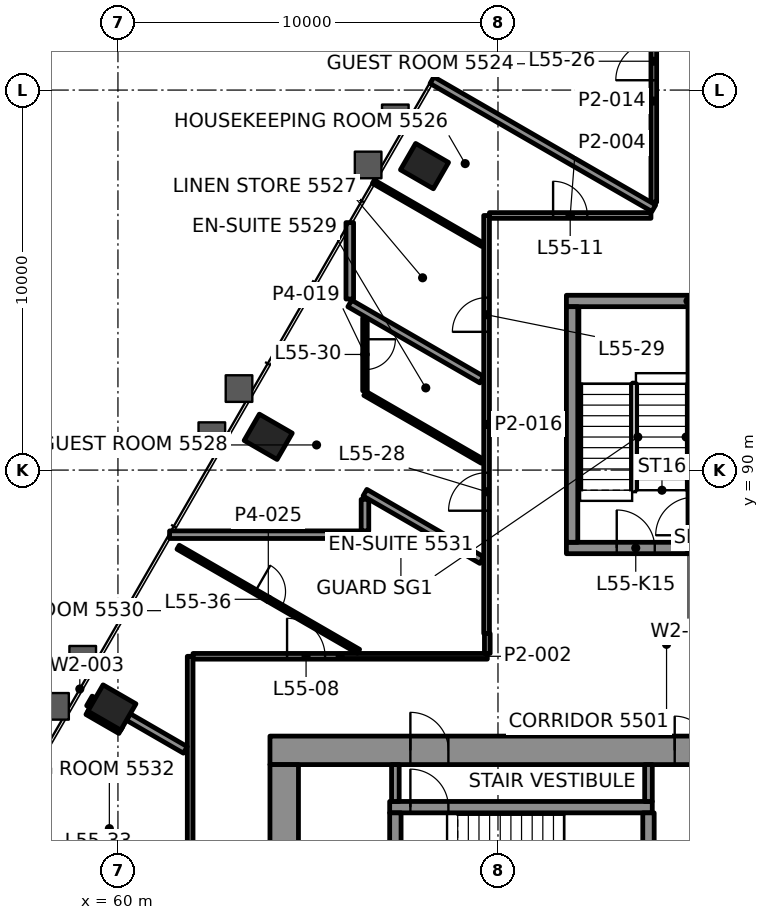
"""IFC4 building model, lengths in metres.
Left out: names, types, materials, properties, quantities, classifications, styles, units other than length and angle.
Written with IfcOpenShell. Run it as: python <this file> out.ifc"""

import sys

from ifc_helpers import new_model, si_unit, direction, frame, frame_2d, origin, origin_2d, place, context, subcontext, project, spatial, rectangle, hollow_rectangle, extrude, element, fill, save


model = new_model("IFC4")
c1 = context("Model", 3, precision=1e-05, world=origin(), true_north=direction((0.0, 1.0)))
c2 = subcontext(c1, "Body", "Model", "MODEL_VIEW")
j1 = project(units=[si_unit("LENGTHUNIT", "METRE"), si_unit("PLANEANGLEUNIT", "RADIAN")], contexts=[c1])
p1 = place(None, origin())
s1 = spatial("IfcSite", under=j1, at=p1, CompositionType="ELEMENT")
p2 = place(p1, origin())
s2 = spatial("IfcBuilding", under=s1, at=p2, CompositionType="ELEMENT")
p3 = place(p2, frame((0.0, 0.0, 233.8)))
s3 = spatial("IfcBuildingStorey", under=s2, at=p3, CompositionType="ELEMENT", Elevation=233.8)
for number, where, z_axis, x_axis in (
    (1, (68.067, 97.999, -0.0), (0.0, 0.0, 1.0), (-0.5, -0.866, 0.0)),
    (2, (63.954, 90.875, -0.0), (0.0, 0.0, 1.0), (-0.5, -0.866, 0.0)),
    (3, (59.841, 83.752, -0.0), (0.0, 0.0, 1.0), (-0.5, -0.866, 0.0)),
):
    element("IfcColumn", number, at=place(p3, frame(where, z_axis=z_axis, x_axis=x_axis)), inside=s3, PredefinedType="COLUMN", context=c2, shape_type="SweptSolid", body=[
        extrude(hollow_rectangle(XDim=0.8, YDim=1.0, WallThickness=0.05, at=origin_2d()), origin(), (0.0, 0.0, 1.0), 3.9),
    ])
p4 = place(p3, frame((64.0, 82.625, 0.0), z_axis=(0.0, 0.0, 1.0), x_axis=(1.0, 0.0, 0.0)))
e4 = element("IfcWall", 4, at=p4, inside=s3, PredefinedType="SHEAR", context=c2, shape_type="SweptSolid", body=[
    extrude(rectangle(XDim=22.0, YDim=0.75, at=frame_2d((11.0, 0.0))), origin(), (0.0, 0.0, 1.0), 3.7),
])
p5 = place(p4, frame((3.695, 0.0, 0.0)))
e5 = element("IfcOpeningElement", 5, at=p5, cuts=e4, PredefinedType="OPENING", context=c2, shape_type="SweptSolid", body=[
    extrude(rectangle(XDim=1.0, YDim=2.1, at=frame_2d((0.5, 1.05))), frame((0.0, 0.385, 0.0), z_axis=(0.0, -1.0, 0.0), x_axis=(1.0, 0.0, 0.0)), (0.0, 0.0, 1.0), 0.77),
])
p6 = place(p4, frame((17.505, 0.0, 0.0)))
e6 = element("IfcOpeningElement", 6, at=p6, cuts=e4, PredefinedType="OPENING", context=c2, shape_type="SweptSolid", body=[
    extrude(rectangle(XDim=1.0, YDim=2.1, at=frame_2d((0.5, 1.05))), frame((0.0, 0.385, 0.0), z_axis=(0.0, -1.0, 0.0), x_axis=(1.0, 0.0, 0.0)), (0.0, 0.0, 1.0), 0.77),
])
p7 = place(p4, frame((10.65, 0.0, 0.0)))
e7 = element("IfcOpeningElement", 7, at=p7, cuts=e4, PredefinedType="OPENING", context=c2, shape_type="SweptSolid", body=[
    extrude(rectangle(XDim=0.9, YDim=2.1, at=frame_2d((0.45, 1.05))), frame((0.0, 0.385, 0.0), z_axis=(0.0, -1.0, 0.0), x_axis=(1.0, 0.0, 0.0)), (0.0, 0.0, 1.0), 0.77),
])
p8 = place(p3, frame((64.375, 67.75, 0.0), z_axis=(0.0, 0.0, 1.0), x_axis=(0.0, 1.0, 0.0)))
e8 = element("IfcWall", 8, at=p8, inside=s3, PredefinedType="SHEAR", context=c2, shape_type="SweptSolid", body=[
    extrude(rectangle(XDim=14.5, YDim=0.75, at=frame_2d((7.25, 0.0))), origin(), (0.0, 0.0, 1.0), 3.7),
])
p9 = place(p8, frame((4.65, 0.0, 0.0)))
e9 = element("IfcOpeningElement", 9, at=p9, cuts=e8, PredefinedType="OPENING", context=c2, shape_type="SweptSolid", body=[
    extrude(rectangle(XDim=1.8, YDim=2.1, at=frame_2d((0.9, 1.05))), frame((0.0, 0.385, 0.0), z_axis=(0.0, -1.0, 0.0), x_axis=(1.0, 0.0, 0.0)), (0.0, 0.0, 1.0), 0.77),
])
p10 = place(p8, frame((2.55, 0.0, 0.0)))
e10 = element("IfcOpeningElement", 10, at=p10, cuts=e8, PredefinedType="OPENING", context=c2, shape_type="SweptSolid", body=[
    extrude(rectangle(XDim=0.9, YDim=2.1, at=frame_2d((0.45, 1.05))), frame((0.0, 0.385, 0.0), z_axis=(0.0, -1.0, 0.0), x_axis=(1.0, 0.0, 0.0)), (0.0, 0.0, 1.0), 0.77),
])
p11 = place(p8, frame((10.35, 0.0, 0.0)))
e11 = element("IfcOpeningElement", 11, at=p11, cuts=e8, PredefinedType="OPENING", context=c2, shape_type="SweptSolid", body=[
    extrude(rectangle(XDim=0.9, YDim=2.1, at=frame_2d((0.45, 1.05))), frame((0.0, 0.385, 0.0), z_axis=(0.0, -1.0, 0.0), x_axis=(1.0, 0.0, 0.0)), (0.0, 0.0, 1.0), 0.77),
])
p12 = place(p3, frame((67.15, 81.13, 0.0), z_axis=(0.0, 0.0, 1.0), x_axis=(1.0, 0.0, 0.0)))
e12 = element("IfcWall", 12, at=p12, inside=s3, PredefinedType="SHEAR", context=c2, shape_type="SweptSolid", body=[
    extrude(rectangle(XDim=6.91, YDim=0.3, at=frame_2d((3.455, 0.0))), origin(), (0.0, 0.0, 1.0), 3.7),
])
p13 = place(p12, frame((0.545, 0.0, 0.0)))
e13 = element("IfcOpeningElement", 13, at=p13, cuts=e12, PredefinedType="OPENING", context=c2, shape_type="SweptSolid", body=[
    extrude(rectangle(XDim=1.0, YDim=2.1, at=frame_2d((0.5, 1.05))), frame((0.0, 0.16, 0.0), z_axis=(0.0, -1.0, 0.0), x_axis=(1.0, 0.0, 0.0)), (0.0, 0.0, 1.0), 0.32),
])
for number, where, z_axis, x_axis in (
    (14, (67.3, 77.9, 0.0), (0.0, 0.0, 1.0), (0.0, 1.0, 0.0)),
    (15, (73.96, 77.9, 0.0), (0.0, 0.0, 1.0), (0.0, 1.0, 0.0)),
):
    element("IfcWall", number, at=place(p3, frame(where, z_axis=z_axis, x_axis=x_axis)), inside=s3, PredefinedType="SHEAR", context=c2, shape_type="SweptSolid", body=[
        extrude(rectangle(XDim=3.08, YDim=0.3, at=frame_2d((1.54, 0.0))), origin(), (0.0, 0.0, 1.0), 3.7),
    ])
p14 = place(p3, frame((71.8, 87.95, 0.0), z_axis=(0.0, 0.0, 1.0), x_axis=(1.0, 0.0, 0.0)))
e16 = element("IfcWall", 16, at=p14, inside=s3, PredefinedType="SHEAR", context=c2, shape_type="SweptSolid", body=[
    extrude(rectangle(XDim=6.4, YDim=0.3, at=frame_2d((3.2, 0.0))), origin(), (0.0, 0.0, 1.0), 3.7),
])
p15 = place(p14, frame((1.325, 0.0, 0.0)))
e17 = element("IfcOpeningElement", 17, at=p15, cuts=e16, PredefinedType="OPENING", context=c2, shape_type="SweptSolid", body=[
    extrude(rectangle(XDim=1.0, YDim=2.1, at=frame_2d((0.5, 1.05))), frame((0.0, 0.16, 0.0), z_axis=(0.0, -1.0, 0.0), x_axis=(1.0, 0.0, 0.0)), (0.0, 0.0, 1.0), 0.32),
])
p16 = place(p14, frame((4.125, 0.0, 0.0)))
e18 = element("IfcOpeningElement", 18, at=p16, cuts=e16, PredefinedType="OPENING", context=c2, shape_type="SweptSolid", body=[
    extrude(rectangle(XDim=1.2, YDim=2.1, at=frame_2d((0.6, 1.05))), frame((0.0, 0.16, 0.0), z_axis=(0.0, -1.0, 0.0), x_axis=(1.0, 0.0, 0.0)), (0.0, 0.0, 1.0), 0.32),
])
p17 = place(p3, frame((71.8, 94.45, 0.0), z_axis=(0.0, 0.0, 1.0), x_axis=(1.0, 0.0, 0.0)))
e19 = element("IfcWall", 19, at=p17, inside=s3, PredefinedType="SHEAR", context=c2, shape_type="SweptSolid", body=[
    extrude(rectangle(XDim=6.4, YDim=0.3, at=frame_2d((3.2, 0.0))), origin(), (0.0, 0.0, 1.0), 3.7),
])
p18 = place(p3, frame((71.95, 88.1, 0.0), z_axis=(0.0, 0.0, 1.0), x_axis=(0.0, 1.0, 0.0)))
e20 = element("IfcWall", 20, at=p18, inside=s3, PredefinedType="SHEAR", context=c2, shape_type="SweptSolid", body=[
    extrude(rectangle(XDim=6.2, YDim=0.3, at=frame_2d((3.1, 0.0))), origin(), (0.0, 0.0, 1.0), 3.7),
])
p19 = place(p3, frame((75.15, 88.1, 0.0), z_axis=(0.0, 0.0, 1.0), x_axis=(0.0, 1.0, 0.0)))
e21 = element("IfcWall", 21, at=p19, inside=s3, PredefinedType="SHEAR", context=c2, shape_type="SweptSolid", body=[
    extrude(rectangle(XDim=6.2, YDim=0.3, at=frame_2d((3.1, 0.0))), origin(), (0.0, 0.0, 1.0), 3.7),
])
p20 = place(p19, frame((0.185, 0.0, 0.0)))
e22 = element("IfcOpeningElement", 22, at=p20, cuts=e21, PredefinedType="OPENING", context=c2, shape_type="SweptSolid", body=[
    extrude(rectangle(XDim=1.0, YDim=2.1, at=frame_2d((0.5, 1.05))), frame((0.0, 0.16, 0.0), z_axis=(0.0, -1.0, 0.0), x_axis=(1.0, 0.0, 0.0)), (0.0, 0.0, 1.0), 0.32),
])
p21 = place(p3, frame((61.976, 85.1, 0.0), z_axis=(0.0, 0.0, 1.0), x_axis=(1.0, 0.0, 0.0)))
e23 = element("IfcWall", 23, at=p21, inside=s3, PredefinedType="PARTITIONING", context=c2, shape_type="SweptSolid", body=[
    extrude(rectangle(XDim=7.744, YDim=0.15, at=frame_2d((3.872, 0.0))), origin(), (0.0, 0.0, 1.0), 3.1),
])
p22 = place(p21, frame((2.475, 0.0, 0.0)))
e24 = element("IfcOpeningElement", 24, at=p22, cuts=e23, PredefinedType="OPENING", context=c2, shape_type="SweptSolid", body=[
    extrude(rectangle(XDim=1.0, YDim=2.1, at=frame_2d((0.5, 1.05))), frame((0.0, 0.085, 0.0), z_axis=(0.0, -1.0, 0.0), x_axis=(1.0, 0.0, 0.0)), (0.0, 0.0, 1.0), 0.17),
])
p23 = place(p3, frame((61.358, 88.3, 0.0), z_axis=(0.0, 0.0, 1.0), x_axis=(1.0, 0.0, 0.0)))
e25 = element("IfcWall", 25, at=p23, inside=s3, PredefinedType="PARTITIONING", context=c2, shape_type="SweptSolid", body=[
    extrude(rectangle(XDim=5.141, YDim=0.2, at=frame_2d((2.571, 0.0))), origin(), (0.0, 0.0, 1.0), 3.022),
])
p24 = place(p3, frame((69.775, 96.7, 0.0), z_axis=(0.0, 0.0, 1.0), x_axis=(1.0, 0.0, 0.0)))
e26 = element("IfcWall", 26, at=p24, inside=s3, PredefinedType="PARTITIONING", context=c2, shape_type="SweptSolid", body=[
    extrude(rectangle(XDim=4.25, YDim=0.15, at=frame_2d((2.125, 0.0))), origin(), (0.0, 0.0, 1.0), 3.1),
])
p25 = place(p24, frame((1.675, 0.0, 0.0)))
e27 = element("IfcOpeningElement", 27, at=p25, cuts=e26, PredefinedType="OPENING", context=c2, shape_type="SweptSolid", body=[
    extrude(rectangle(XDim=0.9, YDim=2.1, at=frame_2d((0.45, 1.05))), frame((0.0, 0.085, 0.0), z_axis=(0.0, -1.0, 0.0), x_axis=(1.0, 0.0, 0.0)), (0.0, 0.0, 1.0), 0.17),
])
p26 = place(p3, frame((59.263, 83.751, 0.0), z_axis=(0.0, 0.0, 1.0), x_axis=(0.499941024108, 0.866059450854, 0.0)))
e28 = element("IfcWall", 28, at=p26, inside=s3, PredefinedType="PARTITIONING", context=c2, shape_type="SweptSolid", body=[
    extrude(rectangle(XDim=0.29, YDim=0.2, at=frame_2d((0.145, 0.0))), origin(), (0.0, 0.0, 1.0), 3.1),
])
p27 = place(p3, frame((74.1, 97.05, 0.0), z_axis=(0.0, 0.0, 1.0), x_axis=(0.0, 1.0, 0.0)))
e29 = element("IfcWall", 29, at=p27, inside=s3, PredefinedType="PARTITIONING", context=c2, shape_type="SweptSolid", body=[
    extrude(rectangle(XDim=5.322, YDim=0.15, at=frame_2d((2.661, 0.0))), origin(), (0.0, 0.0, 1.0), 3.1),
])
p28 = place(p27, frame((3.209, 0.0, 0.0)))
e30 = element("IfcOpeningElement", 30, at=p28, cuts=e29, PredefinedType="OPENING", context=c2, shape_type="SweptSolid", body=[
    extrude(rectangle(XDim=1.0, YDim=2.1, at=frame_2d((0.5, 1.05))), frame((0.0, 0.085, 0.0), z_axis=(0.0, -1.0, 0.0), x_axis=(1.0, 0.0, 0.0)), (0.0, 0.0, 1.0), 0.17),
])
p29 = place(p3, frame((69.719, 85.175, 0.0), z_axis=(0.0, 0.0, 1.0), x_axis=(0.0, 1.0, 0.0)))
e31 = element("IfcWall", 31, at=p29, inside=s3, PredefinedType="PARTITIONING", context=c2, shape_type="SweptSolid", body=[
    extrude(rectangle(XDim=0.525, YDim=0.15, at=frame_2d((0.262, 0.0))), origin(), (0.0, 0.0, 1.0), 3.1),
])
p30 = place(p3, frame((69.7, 85.7, 0.0), z_axis=(0.0, 0.0, 1.0), x_axis=(0.0, 1.0, 0.0)))
e32 = element("IfcWall", 32, at=p30, inside=s3, PredefinedType="PARTITIONING", context=c2, shape_type="SweptSolid", body=[
    extrude(rectangle(XDim=10.999, YDim=0.15, at=frame_2d((5.5, 0.0))), origin(), (0.0, 0.0, 1.0), 3.1),
])
p31 = place(p30, frame((3.23, 0.0, 0.0)))
e33 = element("IfcOpeningElement", 33, at=p31, cuts=e32, PredefinedType="OPENING", context=c2, shape_type="SweptSolid", body=[
    extrude(rectangle(XDim=1.0, YDim=2.1, at=frame_2d((0.5, 1.05))), frame((0.0, 0.085, 0.0), z_axis=(0.0, -1.0, 0.0), x_axis=(1.0, 0.0, 0.0)), (0.0, 0.0, 1.0), 0.17),
])
p32 = place(p30, frame((7.938, 0.0, 0.0)))
e34 = element("IfcOpeningElement", 34, at=p32, cuts=e32, PredefinedType="OPENING", context=c2, shape_type="SweptSolid", body=[
    extrude(rectangle(XDim=0.9, YDim=2.1, at=frame_2d((0.45, 1.05))), frame((0.0, 0.085, 0.0), z_axis=(0.0, -1.0, 0.0), x_axis=(1.0, 0.0, 0.0)), (0.0, 0.0, 1.0), 0.17),
])
p33 = place(p3, frame((66.5, 88.4, 0.0), z_axis=(0.0, 0.0, 1.0), x_axis=(0.0, 1.0, 0.0)))
e35 = element("IfcWall", 35, at=p33, inside=s3, PredefinedType="PARTITIONING", context=c2, shape_type="SweptSolid", body=[
    extrude(rectangle(XDim=0.83, YDim=0.2, at=frame_2d((0.415, 0.0))), origin(), (0.0, 0.0, 1.0), 3.1),
])
p34 = place(p3, frame((66.5, 93.999, 0.0), z_axis=(0.0, 0.0, 1.0), x_axis=(0.0, -1.0, 0.0)))
e36 = element("IfcWall", 36, at=p34, inside=s3, PredefinedType="PARTITIONING", context=c2, shape_type="SweptSolid", body=[
    extrude(rectangle(XDim=1.912, YDim=0.12, at=frame_2d((0.956, 0.0))), origin(), (0.0, 0.0, 1.0), 3.1),
])
p35 = place(p34, frame((0.556, 0.0, 0.0)))
e37 = element("IfcOpeningElement", 37, at=p35, cuts=e36, PredefinedType="OPENING", context=c2, shape_type="SweptSolid", body=[
    extrude(rectangle(XDim=0.8, YDim=2.1, at=frame_2d((0.4, 1.05))), frame((0.0, 0.07, 0.0), z_axis=(0.0, -1.0, 0.0), x_axis=(1.0, 0.0, 0.0)), (0.0, 0.0, 1.0), 0.14),
])
p36 = place(p3, frame((66.1, 94.502, 0.0), z_axis=(0.0, 0.0, 1.0), x_axis=(0.0, 1.0, 0.0)))
e38 = element("IfcWall", 38, at=p36, inside=s3, PredefinedType="PARTITIONING", context=c2, shape_type="SweptSolid", body=[
    extrude(rectangle(XDim=2.011, YDim=0.2, at=frame_2d((1.005, 0.0))), origin(), (0.0, 0.0, 1.0), 3.022),
])
p37 = place(p3, frame((61.9, 68.476, 0.0), z_axis=(0.0, 0.0, 1.0), x_axis=(0.0, 1.0, 0.0)))
e39 = element("IfcWall", 39, at=p37, inside=s3, PredefinedType="PARTITIONING", context=c2, shape_type="SweptSolid", body=[
    extrude(rectangle(XDim=16.624, YDim=0.15, at=frame_2d((8.312, 0.0))), origin(), (0.0, 0.0, 1.0), 3.1),
])
p38 = place(p37, frame((1.946, 0.0, 0.0)))
e40 = element("IfcOpeningElement", 40, at=p38, cuts=e39, PredefinedType="OPENING", context=c2, shape_type="SweptSolid", body=[
    extrude(rectangle(XDim=0.9, YDim=2.1, at=frame_2d((0.45, 1.05))), frame((0.0, 0.085, 0.0), z_axis=(0.0, -1.0, 0.0), x_axis=(1.0, 0.0, 0.0)), (0.0, 0.0, 1.0), 0.17),
])
p39 = place(p37, frame((10.263, 0.0, 0.0)))
e41 = element("IfcOpeningElement", 41, at=p39, cuts=e39, PredefinedType="OPENING", context=c2, shape_type="SweptSolid", body=[
    extrude(rectangle(XDim=1.0, YDim=2.1, at=frame_2d((0.5, 1.05))), frame((0.0, 0.085, 0.0), z_axis=(0.0, -1.0, 0.0), x_axis=(1.0, 0.0, 0.0)), (0.0, 0.0, 1.0), 0.17),
])
p40 = place(p3, frame((74.1, 96.89, 0.0), z_axis=(0.0, 0.0, 1.0), x_axis=(-0.866036585879, 0.499980631543, 0.0)))
e42 = element("IfcWall", 42, at=p40, inside=s3, PredefinedType="PARTITIONING", context=c2, shape_type="SweptSolid", body=[
    extrude(rectangle(XDim=6.74, YDim=0.2, at=frame_2d((3.37, 0.0))), origin(), (0.0, 0.0, 1.0), 3.1),
])
p41 = place(p3, frame((69.599, 95.927, 0.0), z_axis=(0.0, 0.0, 1.0), x_axis=(-0.866019199568, 0.500010745865, 0.0)))
e43 = element("IfcWall", 43, at=p41, inside=s3, PredefinedType="PARTITIONING", context=c2, shape_type="SweptSolid", body=[
    extrude(rectangle(XDim=3.323, YDim=0.1, at=frame_2d((1.662, 0.0))), origin(), (0.0, 0.0, 1.0), 3.022),
])
p42 = place(p3, frame((69.573, 92.38, 0.0), z_axis=(0.0, 0.0, 1.0), x_axis=(-0.866020331166, 0.500008785931, 0.0)))
e44 = element("IfcWall", 44, at=p42, inside=s3, PredefinedType="PARTITIONING", context=c2, shape_type="SweptSolid", body=[
    extrude(rectangle(XDim=4.01, YDim=0.2, at=frame_2d((2.005, 0.0))), origin(), (0.0, 0.0, 1.0), 3.022),
])
p43 = place(p3, frame((69.59, 90.233, 0.0), z_axis=(0.0, 0.0, 1.0), x_axis=(-0.866028357664, 0.499994883695, 0.0)))
e45 = element("IfcWall", 45, at=p43, inside=s3, PredefinedType="PARTITIONING", context=c2, shape_type="SweptSolid", body=[
    extrude(rectangle(XDim=3.568, YDim=0.12, at=frame_2d((1.784, 0.0))), origin(), (0.0, 0.0, 1.0), 3.1),
])
p44 = place(p3, frame((69.573, 87.631, 0.0), z_axis=(0.0, 0.0, 1.0), x_axis=(-0.866028616566, 0.499994435258, 0.0)))
e46 = element("IfcWall", 46, at=p44, inside=s3, PredefinedType="PARTITIONING", context=c2, shape_type="SweptSolid", body=[
    extrude(rectangle(XDim=3.548, YDim=0.2, at=frame_2d((1.774, 0.0))), origin(), (0.0, 0.0, 1.0), 3.1),
])
p45 = place(p3, frame((61.583, 87.97, 0.0), z_axis=(0.0, 0.0, 1.0), x_axis=(0.866027562125, -0.499996261625, 0.0)))
e47 = element("IfcWall", 47, at=p45, inside=s3, PredefinedType="PARTITIONING", context=c2, shape_type="SweptSolid", body=[
    extrude(rectangle(XDim=5.48, YDim=0.12, at=frame_2d((2.74, 0.0))), origin(), (0.0, 0.0, 1.0), 3.022),
])
p46 = place(p45, frame((2.34, 0.0, 0.0)))
e48 = element("IfcOpeningElement", 48, at=p46, cuts=e47, PredefinedType="OPENING", context=c2, shape_type="SweptSolid", body=[
    extrude(rectangle(XDim=0.8, YDim=2.1, at=frame_2d((0.4, 1.05))), frame((0.0, 0.07, 0.0), z_axis=(0.0, -1.0, 0.0), x_axis=(1.0, 0.0, 0.0)), (0.0, 0.0, 1.0), 0.14),
])
p47 = place(p3, frame((61.773, 82.637, 0.0), z_axis=(0.0, 0.0, 1.0), x_axis=(-0.866082241464, 0.499901541327, 0.0)))
e49 = element("IfcWall", 49, at=p47, inside=s3, PredefinedType="PARTITIONING", context=c2, shape_type="SweptSolid", body=[
    extrude(rectangle(XDim=1.731, YDim=0.2, at=frame_2d((0.865, 0.0))), origin(), (0.0, 0.0, 1.0), 3.1),
])
p48 = place(p3, frame((60.074, 83.156, 0.0), z_axis=(0.0, 0.0, 1.0), x_axis=(-0.866010750942, 0.50002537861, 0.0)))
e50 = element("IfcWall", 50, at=p48, inside=s3, PredefinedType="PARTITIONING", context=c2, shape_type="SweptSolid", body=[
    extrude(rectangle(XDim=1.0, YDim=0.2, at=frame_2d((0.5, 0.0))), origin(), (0.0, 0.0, 1.0), 3.022),
])
for number, where, z_axis, x_axis in (
    (51, (67.3, 81.28, 0.0), (0.0, 0.0, 1.0), (0.0, 1.0, 0.0)),
    (52, (73.96, 81.28, 0.0), (0.0, 0.0, 1.0), (0.0, 1.0, 0.0)),
):
    element("IfcWall", number, at=place(p3, frame(where, z_axis=z_axis, x_axis=x_axis)), inside=s3, PredefinedType="PARTITIONING", context=c2, shape_type="SweptSolid", body=[
        extrude(rectangle(XDim=0.97, YDim=0.2, at=frame_2d((0.485, 0.0))), origin(), (0.0, 0.0, 1.0), 3.7),
    ])
p49 = place(p22, origin())
e53 = element("IfcDoor", 53, at=p49, inside=s3, OperationType="SINGLE_SWING_LEFT", PredefinedType="DOOR", context=c2, shape_type="SweptSolid", body=[
    extrude(rectangle(XDim=1.0, YDim=2.1, at=frame_2d((0.5, 1.05))), frame((0.0, 0.025, 0.0), z_axis=(0.0, -1.0, 0.0), x_axis=(1.0, 0.0, 0.0)), (0.0, 0.0, 1.0), 0.05),
])
fill(e24, e53)
p50 = place(p25, origin())
e54 = element("IfcDoor", 54, at=p50, inside=s3, OperationType="SINGLE_SWING_LEFT", PredefinedType="DOOR", context=c2, shape_type="SweptSolid", body=[
    extrude(rectangle(XDim=0.9, YDim=2.1, at=frame_2d((0.45, 1.05))), frame((0.0, 0.025, 0.0), z_axis=(0.0, -1.0, 0.0), x_axis=(1.0, 0.0, 0.0)), (0.0, 0.0, 1.0), 0.05),
])
fill(e27, e54)
p51 = place(p28, origin())
e55 = element("IfcDoor", 55, at=p51, inside=s3, OperationType="SINGLE_SWING_LEFT", PredefinedType="DOOR", context=c2, shape_type="SweptSolid", body=[
    extrude(rectangle(XDim=1.0, YDim=2.1, at=frame_2d((0.5, 1.05))), frame((0.0, 0.025, 0.0), z_axis=(0.0, -1.0, 0.0), x_axis=(1.0, 0.0, 0.0)), (0.0, 0.0, 1.0), 0.05),
])
fill(e30, e55)
p52 = place(p31, origin())
e56 = element("IfcDoor", 56, at=p52, inside=s3, OperationType="SINGLE_SWING_LEFT", PredefinedType="DOOR", context=c2, shape_type="SweptSolid", body=[
    extrude(rectangle(XDim=1.0, YDim=2.1, at=frame_2d((0.5, 1.05))), frame((0.0, 0.025, 0.0), z_axis=(0.0, -1.0, 0.0), x_axis=(1.0, 0.0, 0.0)), (0.0, 0.0, 1.0), 0.05),
])
fill(e33, e56)
p53 = place(p32, origin())
e57 = element("IfcDoor", 57, at=p53, inside=s3, OperationType="SINGLE_SWING_RIGHT", PredefinedType="DOOR", context=c2, shape_type="SweptSolid", body=[
    extrude(rectangle(XDim=0.9, YDim=2.1, at=frame_2d((0.45, 1.05))), frame((0.0, 0.025, 0.0), z_axis=(0.0, -1.0, 0.0), x_axis=(1.0, 0.0, 0.0)), (0.0, 0.0, 1.0), 0.05),
])
fill(e34, e57)
p54 = place(p35, origin())
e58 = element("IfcDoor", 58, at=p54, inside=s3, OperationType="SINGLE_SWING_LEFT", PredefinedType="DOOR", context=c2, shape_type="SweptSolid", body=[
    extrude(rectangle(XDim=0.8, YDim=2.1, at=frame_2d((0.4, 1.05))), frame((0.0, 0.025, 0.0), z_axis=(0.0, -1.0, 0.0), x_axis=(1.0, 0.0, 0.0)), (0.0, 0.0, 1.0), 0.05),
])
fill(e37, e58)
p55 = place(p46, origin())
e59 = element("IfcDoor", 59, at=p55, inside=s3, OperationType="SINGLE_SWING_LEFT", PredefinedType="DOOR", context=c2, shape_type="SweptSolid", body=[
    extrude(rectangle(XDim=0.8, YDim=2.1, at=frame_2d((0.4, 1.05))), frame((0.0, 0.025, 0.0), z_axis=(0.0, -1.0, 0.0), x_axis=(1.0, 0.0, 0.0)), (0.0, 0.0, 1.0), 0.05),
])
fill(e48, e59)
p56 = place(p3, origin())
p57 = place(p56, frame((69.963, 103.234, 0.15), z_axis=(0.0, 0.0, 1.0), x_axis=(-0.5, -0.866025, 0.0)))
p58 = place(p57, origin())
e60 = element("IfcWindow", 60, at=p58, inside=s3, PartitioningType="SINGLE_PANEL", PredefinedType="WINDOW", context=c2, shape_type="SweptSolid", body=[
    extrude(rectangle(XDim=2.667, YDim=3.55, at=frame_2d((1.333, 1.775))), frame((0.0, 0.03, 0.0), z_axis=(0.0, -1.0, 0.0), x_axis=(1.0, 0.0, 0.0)), (0.0, 0.0, 1.0), 0.06),
])
p59 = place(p13, origin())
e61 = element("IfcDoor", 61, at=p59, inside=s3, OperationType="SINGLE_SWING_RIGHT", PredefinedType="DOOR", context=c2, shape_type="SweptSolid", body=[
    extrude(rectangle(XDim=1.0, YDim=2.1, at=frame_2d((0.5, 1.05))), frame((0.0, 0.025, 0.0), z_axis=(0.0, -1.0, 0.0), x_axis=(1.0, 0.0, 0.0)), (0.0, 0.0, 1.0), 0.05),
])
fill(e13, e61)
p60 = place(p5, origin())
e62 = element("IfcDoor", 62, at=p60, inside=s3, OperationType="SINGLE_SWING_LEFT", PredefinedType="DOOR", context=c2, shape_type="SweptSolid", body=[
    extrude(rectangle(XDim=1.0, YDim=2.1, at=frame_2d((0.5, 1.05))), frame((0.0, 0.095, 0.0), z_axis=(0.0, -1.0, 0.0), x_axis=(1.0, 0.0, 0.0)), (0.0, 0.0, 1.0), 0.19),
])
fill(e5, e62)
p61 = place(p15, origin())
e63 = element("IfcDoor", 63, at=p61, inside=s3, OperationType="SINGLE_SWING_RIGHT", PredefinedType="DOOR", context=c2, shape_type="SweptSolid", body=[
    extrude(rectangle(XDim=1.0, YDim=2.1, at=frame_2d((0.5, 1.05))), frame((0.0, 0.025, 0.0), z_axis=(0.0, -1.0, 0.0), x_axis=(1.0, 0.0, 0.0)), (0.0, 0.0, 1.0), 0.05),
])
fill(e17, e63)
p62 = place(p7, origin())
e64 = element("IfcDoor", 64, at=p62, inside=s3, OperationType="SINGLE_SWING_LEFT", PredefinedType="DOOR", context=c2, shape_type="SweptSolid", body=[
    extrude(rectangle(XDim=0.9, YDim=2.1, at=frame_2d((0.45, 1.05))), frame((0.0, 0.095, 0.0), z_axis=(0.0, -1.0, 0.0), x_axis=(1.0, 0.0, 0.0)), (0.0, 0.0, 1.0), 0.19),
])
fill(e7, e64)
save(model, sys.argv[1])
